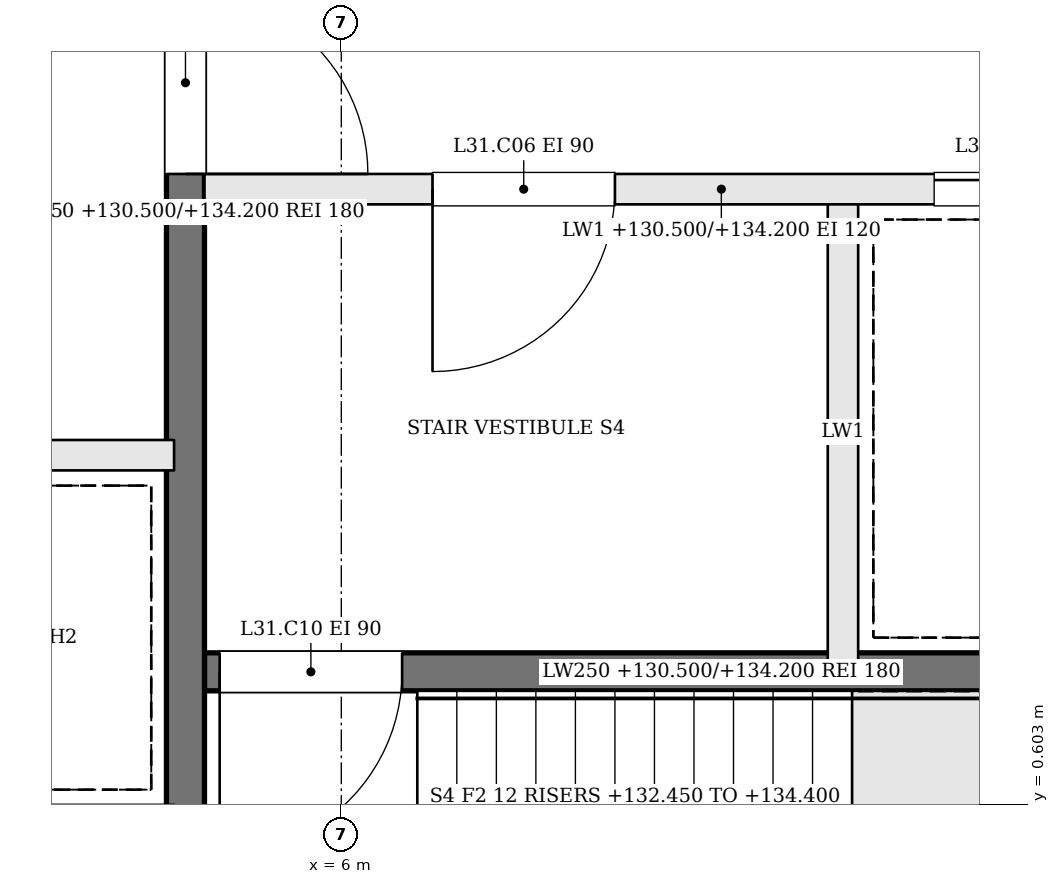
"""IFC4 building model, lengths in metres.
Left out: names, types, materials, properties, quantities, classifications, styles, units other than length and angle.
Written with IfcOpenShell. Run it as: python <this file> out.ifc"""

import sys

from ifc_helpers import new_model, si_unit, direction, frame, frame_2d, origin, place, context, subcontext, project, spatial, rectangle, extrude, element, fill, save


model = new_model("IFC4")
c1 = context("Model", 3, precision=1e-05, world=origin(), true_north=direction((0.0, 1.0)))
c2 = subcontext(c1, "Body", "Model", "MODEL_VIEW")
j1 = project(units=[si_unit("LENGTHUNIT", "METRE"), si_unit("PLANEANGLEUNIT", "RADIAN")], contexts=[c1])
p1 = place(None, origin())
s1 = spatial("IfcSite", under=j1, at=p1, CompositionType="ELEMENT")
p2 = place(p1, origin())
s2 = spatial("IfcBuilding", under=s1, at=p2, CompositionType="ELEMENT")
p3 = place(p2, frame((0.0, 0.0, 130.5)))
s3 = spatial("IfcBuildingStorey", under=s2, at=p3, CompositionType="ELEMENT", Elevation=130.5)
p4 = place(p3, frame((11.9, 4.65, 0.0), z_axis=(0.0, 0.0, 1.0), x_axis=(-1.0, 0.0, 0.0)))
e1 = element("IfcWall", 1, at=p4, inside=s3, PredefinedType="SOLIDWALL", context=c2, shape_type="SweptSolid", body=[
    extrude(rectangle(XDim=6.8, YDim=0.2, at=frame_2d((3.4, 0.0))), origin(), (0.0, 0.0, 1.0), 3.7),
])
p5 = place(p4, frame((4.1, 0.0, 0.0)))
e2 = element("IfcOpeningElement", 2, at=p5, cuts=e1, PredefinedType="OPENING", context=c2, shape_type="SweptSolid", body=[
    extrude(rectangle(XDim=1.2, YDim=2.1, at=frame_2d((0.6, 1.05))), frame((0.0, 0.11, 0.0), z_axis=(0.0, -1.0, 0.0), x_axis=(1.0, 0.0, 0.0)), (0.0, 0.0, 1.0), 0.22),
])
p6 = place(p4, frame((0.8, 0.0, 0.0)))
e3 = element("IfcOpeningElement", 3, at=p6, cuts=e1, PredefinedType="OPENING", context=c2, shape_type="SweptSolid", body=[
    extrude(rectangle(XDim=1.2, YDim=2.1, at=frame_2d((0.6, 1.05))), frame((0.0, 0.11, 0.0), z_axis=(0.0, -1.0, 0.0), x_axis=(1.0, 0.0, 0.0)), (0.0, 0.0, 1.0), 0.22),
])
p7 = place(p3, frame((11.9, 1.475, 0.0), z_axis=(0.0, 0.0, 1.0), x_axis=(-1.0, 0.0, 0.0)))
e4 = element("IfcWall", 4, at=p7, inside=s3, PredefinedType="SOLIDWALL", context=c2, shape_type="SweptSolid", body=[
    extrude(rectangle(XDim=6.8, YDim=0.25, at=frame_2d((3.4, 0.0))), origin(), (0.0, 0.0, 1.0), 3.7),
])
p8 = place(p7, frame((5.5, 0.0, 0.0)))
e5 = element("IfcOpeningElement", 5, at=p8, cuts=e4, PredefinedType="OPENING", context=c2, shape_type="SweptSolid", body=[
    extrude(rectangle(XDim=1.2, YDim=2.1, at=frame_2d((0.6, 1.05))), frame((0.0, 0.135, 0.0), z_axis=(0.0, -1.0, 0.0), x_axis=(1.0, 0.0, 0.0)), (0.0, 0.0, 1.0), 0.27),
])
p9 = place(p3, frame((9.3, 4.55, 0.0), z_axis=(0.0, 0.0, 1.0), x_axis=(0.0, -1.0, 0.0)))
e6 = element("IfcWall", 6, at=p9, inside=s3, PredefinedType="SOLIDWALL", context=c2, shape_type="SweptSolid", body=[
    extrude(rectangle(XDim=3.0, YDim=0.2, at=frame_2d((1.5, 0.0))), origin(), (0.0, 0.0, 1.0), 3.7),
])
p10 = place(p3, frame((4.975, 10.9, 0.0), z_axis=(0.0, 0.0, 1.0), x_axis=(0.0, -1.0, 0.0)))
e7 = element("IfcWall", 7, at=p10, inside=s3, PredefinedType="SOLIDWALL", context=c2, shape_type="SweptSolid", body=[
    extrude(rectangle(XDim=12.8, YDim=0.25, at=frame_2d((6.4, 0.0))), origin(), (0.0, 0.0, 1.0), 3.7),
])
p11 = place(p10, frame((4.95, 0.0, 0.0)))
e8 = element("IfcOpeningElement", 8, at=p11, cuts=e7, PredefinedType="OPENING", context=c2, shape_type="SweptSolid", body=[
    extrude(rectangle(XDim=1.2, YDim=2.1, at=frame_2d((0.6, 1.05))), frame((0.0, 0.135, 0.0), z_axis=(0.0, -1.0, 0.0), x_axis=(1.0, 0.0, 0.0)), (0.0, 0.0, 1.0), 0.27),
])
p12 = place(p3, frame((-4.9, 2.9, 0.0), z_axis=(0.0, 0.0, 1.0), x_axis=(1.0, 0.0, 0.0)))
e9 = element("IfcWall", 9, at=p12, inside=s3, PredefinedType="SOLIDWALL", context=c2, shape_type="SweptSolid", body=[
    extrude(rectangle(XDim=9.8, YDim=0.2, at=frame_2d((4.9, 0.0))), origin(), (0.0, 0.0, 1.0), 3.7),
])
p13 = place(p12, frame((0.675, 0.0, 0.0)))
e10 = element("IfcOpeningElement", 10, at=p13, cuts=e9, PredefinedType="OPENING", context=c2, shape_type="SweptSolid", body=[
    extrude(rectangle(XDim=1.1, YDim=2.1, at=frame_2d((0.55, 1.05))), frame((0.0, 0.11, 0.0), z_axis=(0.0, -1.0, 0.0), x_axis=(1.0, 0.0, 0.0)), (0.0, 0.0, 1.0), 0.22),
])
p14 = place(p12, frame((3.175, 0.0, 0.0)))
e11 = element("IfcOpeningElement", 11, at=p14, cuts=e9, PredefinedType="OPENING", context=c2, shape_type="SweptSolid", body=[
    extrude(rectangle(XDim=1.0, YDim=2.1, at=frame_2d((0.5, 1.05))), frame((0.0, 0.11, 0.0), z_axis=(0.0, -1.0, 0.0), x_axis=(1.0, 0.0, 0.0)), (0.0, 0.0, 1.0), 0.22),
])
p15 = place(p11, origin())
e12 = element("IfcDoor", 12, at=p15, inside=s3, OperationType="SINGLE_SWING_RIGHT", PredefinedType="DOOR", context=c2, shape_type="SweptSolid", body=[
    extrude(rectangle(XDim=1.2, YDim=2.1, at=frame_2d((0.6, 1.05))), frame((0.0, 0.025, 0.0), z_axis=(0.0, -1.0, 0.0), x_axis=(1.0, 0.0, 0.0)), (0.0, 0.0, 1.0), 0.05),
])
fill(e8, e12)
p16 = place(p5, origin())
e13 = element("IfcDoor", 13, at=p16, inside=s3, OperationType="SINGLE_SWING_RIGHT", PredefinedType="DOOR", context=c2, shape_type="SweptSolid", body=[
    extrude(rectangle(XDim=1.2, YDim=2.1, at=frame_2d((0.6, 1.05))), frame((0.0, 0.025, 0.0), z_axis=(0.0, -1.0, 0.0), x_axis=(1.0, 0.0, 0.0)), (0.0, 0.0, 1.0), 0.05),
])
fill(e2, e13)
p17 = place(p8, origin())
e14 = element("IfcDoor", 14, at=p17, inside=s3, OperationType="SINGLE_SWING_RIGHT", PredefinedType="DOOR", context=c2, shape_type="SweptSolid", body=[
    extrude(rectangle(XDim=1.2, YDim=2.1, at=frame_2d((0.6, 1.05))), frame((0.0, 0.025, 0.0), z_axis=(0.0, -1.0, 0.0), x_axis=(1.0, 0.0, 0.0)), (0.0, 0.0, 1.0), 0.05),
])
fill(e5, e14)
p18 = place(p6, origin())
e15 = element("IfcDoor", 15, at=p18, inside=s3, OperationType="SLIDING_TO_RIGHT", PredefinedType="DOOR", context=c2, shape_type="SweptSolid", body=[
    extrude(rectangle(XDim=1.2, YDim=2.1, at=frame_2d((0.6, 1.05))), frame((0.0, 0.025, 0.0), z_axis=(0.0, -1.0, 0.0), x_axis=(1.0, 0.0, 0.0)), (0.0, 0.0, 1.0), 0.05),
])
fill(e3, e15)
save(model, sys.argv[1])
